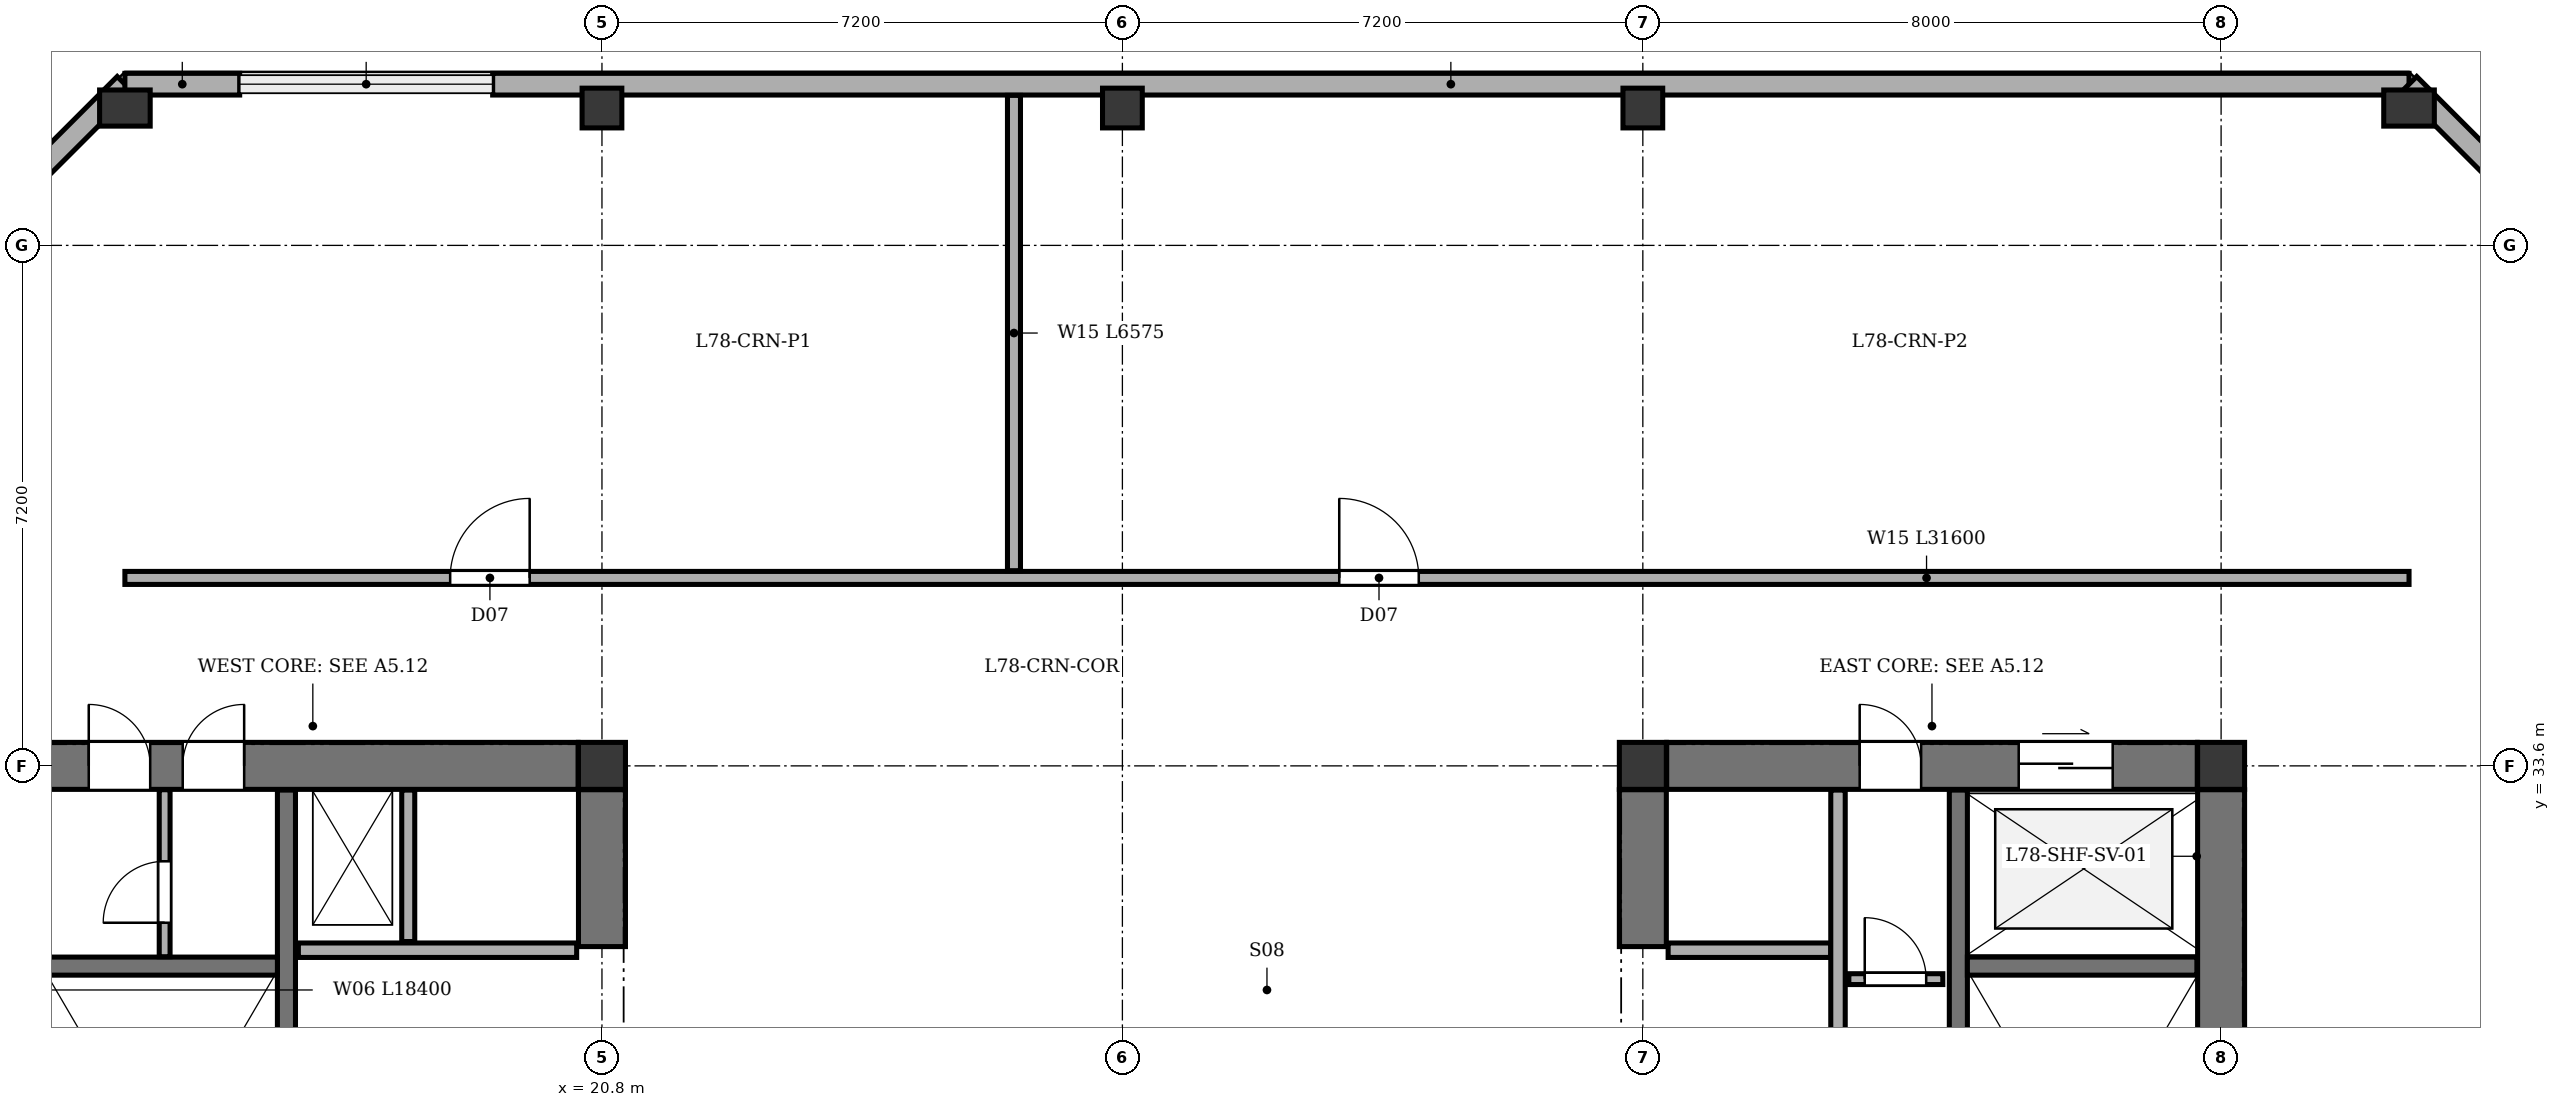
"""IFC4 building model, lengths in metres.
Left out: names, types, materials, properties, quantities, classifications, styles, units other than length and angle.
Written with IfcOpenShell. Run it as: python <this file> out.ifc"""

import sys

from ifc_helpers import new_model, si_unit, direction, frame, frame_2d, origin, origin_2d, place, context, subcontext, project, spatial, rectangle, extrude, element, fill, save


model = new_model("IFC4")
c1 = context("Model", 3, precision=1e-05, world=origin(), true_north=direction((0.0, 1.0)))
c2 = subcontext(c1, "Body", "Model", "MODEL_VIEW")
j1 = project(units=[si_unit("LENGTHUNIT", "METRE"), si_unit("PLANEANGLEUNIT", "RADIAN")], contexts=[c1])
p1 = place(None, origin())
s1 = spatial("IfcSite", under=j1, at=p1, CompositionType="ELEMENT")
p2 = place(p1, origin())
s2 = spatial("IfcBuilding", under=s1, at=p2, CompositionType="ELEMENT")
p3 = place(p2, frame((0.0, 0.0, 296.4)))
s3 = spatial("IfcBuildingStorey", under=s2, at=p3, CompositionType="ELEMENT", Elevation=296.4)
for number, where, z_axis, x_axis in (
    (1, (20.8, 33.6, 0.0), (0.0, 0.0, 1.0), (1.0, 0.0, 0.0)),
    (2, (35.2, 33.6, 0.0), (0.0, 0.0, 1.0), (1.0, 0.0, 0.0)),
    (3, (43.2, 33.6, 0.0), (0.0, 0.0, 1.0), (1.0, 0.0, 0.0)),
):
    element("IfcColumn", number, at=place(p3, frame(where, z_axis=z_axis, x_axis=x_axis)), inside=s3, PredefinedType="COLUMN", context=c2, shape_type="SweptSolid", body=[
        extrude(rectangle(XDim=0.65, YDim=0.65, at=origin_2d()), origin(), (0.0, 0.0, 1.0), 4.2),
    ])
p4 = place(p3, frame((14.2, 42.7, 0.0), z_axis=(0.0, 0.0, 1.0), x_axis=(1.0, 0.0, 0.0)))
e4 = element("IfcColumn", 4, at=p4, inside=s3, PredefinedType="COLUMN", context=c2, shape_type="SweptSolid", body=[
    extrude(rectangle(XDim=0.5, YDim=0.7, at=origin_2d()), origin(), (0.0, 0.0, 1.0), 4.2),
])
for number, where, z_axis, x_axis in (
    (5, (20.8, 42.7, 0.0), (0.0, 0.0, 1.0), (1.0, 0.0, 0.0)),
    (6, (28.0, 42.7, 0.0), (0.0, 0.0, 1.0), (1.0, 0.0, 0.0)),
    (7, (35.2, 42.7, 0.0), (0.0, 0.0, 1.0), (1.0, 0.0, 0.0)),
):
    element("IfcColumn", number, at=place(p3, frame(where, z_axis=z_axis, x_axis=x_axis)), inside=s3, PredefinedType="COLUMN", context=c2, shape_type="SweptSolid", body=[
        extrude(rectangle(XDim=0.55, YDim=0.55, at=origin_2d()), origin(), (0.0, 0.0, 1.0), 4.2),
    ])
p5 = place(p3, frame((45.8, 42.7, 0.0), z_axis=(0.0, 0.0, 1.0), x_axis=(1.0, 0.0, 0.0)))
e8 = element("IfcColumn", 8, at=p5, inside=s3, PredefinedType="COLUMN", context=c2, shape_type="SweptSolid", body=[
    extrude(rectangle(XDim=0.5, YDim=0.7, at=origin_2d()), origin(), (0.0, 0.0, 1.0), 4.2),
])
p6 = place(p3, frame((10.87, 39.7, 0.0), z_axis=(0.0, 0.0, 1.0), x_axis=(0.707080859425, 0.707132701998, 0.0)))
e9 = element("IfcWall", 9, at=p6, inside=s3, PredefinedType="STANDARD", context=c2, shape_type="SweptSolid", body=[
    extrude(rectangle(XDim=4.709, YDim=0.3, at=frame_2d((2.354, 0.0))), origin(), (0.0, 0.0, 1.0), 3.545),
])
p7 = place(p3, frame((14.2, 43.03, 0.0), z_axis=(0.0, 0.0, 1.0), x_axis=(1.0, 0.0, 0.0)))
e10 = element("IfcWall", 10, at=p7, inside=s3, PredefinedType="STANDARD", context=c2, shape_type="SweptSolid", body=[
    extrude(rectangle(XDim=1.588, YDim=0.3, at=frame_2d((0.794, 0.0))), origin(), (0.0, 0.0, 1.0), 3.545),
])
p8 = place(p3, frame((19.288, 43.03, 0.0), z_axis=(0.0, 0.0, 1.0), x_axis=(1.0, 0.0, 0.0)))
e11 = element("IfcWall", 11, at=p8, inside=s3, PredefinedType="STANDARD", context=c2, shape_type="SweptSolid", body=[
    extrude(rectangle(XDim=26.512, YDim=0.3, at=frame_2d((13.256, 0.0))), origin(), (0.0, 0.0, 1.0), 3.545),
])
p9 = place(p3, frame((45.8, 43.03, 0.0), z_axis=(0.0, 0.0, 1.0), x_axis=(0.707080859425, -0.707132701998, 0.0)))
e12 = element("IfcWall", 12, at=p9, inside=s3, PredefinedType="STANDARD", context=c2, shape_type="SweptSolid", body=[
    extrude(rectangle(XDim=4.709, YDim=0.3, at=frame_2d((2.354, 0.0))), origin(), (0.0, 0.0, 1.0), 3.545),
])
p10 = place(p3, frame((13.13, 33.6, 0.0), z_axis=(0.0, 0.0, 1.0), x_axis=(1.0, 0.0, 0.0)))
e13 = element("IfcWall", 13, at=p10, inside=s3, PredefinedType="SHEAR", context=c2, shape_type="SweptSolid", body=[
    extrude(rectangle(XDim=7.34, YDim=0.65, at=frame_2d((3.67, 0.0))), origin(), (0.0, 0.0, 1.0), 3.92),
])
p11 = place(p10, frame((0.57, 0.0, 0.0)))
e14 = element("IfcOpeningElement", 14, at=p11, cuts=e13, PredefinedType="OPENING", context=c2, shape_type="SweptSolid", body=[
    extrude(rectangle(XDim=0.85, YDim=2.02, at=frame_2d((0.425, 1.01))), frame((0.0, 0.335, 0.0), z_axis=(0.0, -1.0, 0.0), x_axis=(1.0, 0.0, 0.0)), (0.0, 0.0, 1.0), 0.67),
])
p12 = place(p10, frame((1.87, 0.0, 0.0)))
e15 = element("IfcOpeningElement", 15, at=p12, cuts=e13, PredefinedType="OPENING", context=c2, shape_type="SweptSolid", body=[
    extrude(rectangle(XDim=0.85, YDim=2.02, at=frame_2d((0.425, 1.01))), frame((0.0, 0.335, 0.0), z_axis=(0.0, -1.0, 0.0), x_axis=(1.0, 0.0, 0.0)), (0.0, 0.0, 1.0), 0.67),
])
p13 = place(p3, frame((20.8, 31.1, 0.0), z_axis=(0.0, 0.0, 1.0), x_axis=(0.0, 1.0, 0.0)))
e16 = element("IfcWall", 16, at=p13, inside=s3, PredefinedType="SHEAR", context=c2, shape_type="SweptSolid", body=[
    extrude(rectangle(XDim=2.17, YDim=0.65, at=frame_2d((1.085, 0.0))), origin(), (0.0, 0.0, 1.0), 3.92),
])
p14 = place(p3, frame((16.435, 21.135, 0.0), z_axis=(0.0, 0.0, 1.0), x_axis=(0.0, 1.0, 0.0)))
e17 = element("IfcWall", 17, at=p14, inside=s3, PredefinedType="SHEAR", context=c2, shape_type="SweptSolid", body=[
    extrude(rectangle(XDim=12.13, YDim=0.25, at=frame_2d((6.065, 0.0))), origin(), (0.0, 0.0, 1.0), 3.92),
])
p15 = place(p14, frame((0.515, 0.0, 0.0)))
e18 = element("IfcOpeningElement", 18, at=p15, cuts=e17, PredefinedType="OPENING", context=c2, shape_type="SweptSolid", body=[
    extrude(rectangle(XDim=1.2, YDim=2.15, at=frame_2d((0.6, 1.075))), frame((0.0, 0.135, 0.0), z_axis=(0.0, -1.0, 0.0), x_axis=(1.0, 0.0, 0.0)), (0.0, 0.0, 1.0), 0.27),
])
p16 = place(p14, frame((2.665, 0.0, 0.0)))
e19 = element("IfcOpeningElement", 19, at=p16, cuts=e17, PredefinedType="OPENING", context=c2, shape_type="SweptSolid", body=[
    extrude(rectangle(XDim=1.15, YDim=2.15, at=frame_2d((0.575, 1.075))), frame((0.0, 0.135, 0.0), z_axis=(0.0, -1.0, 0.0), x_axis=(1.0, 0.0, 0.0)), (0.0, 0.0, 1.0), 0.27),
])
p17 = place(p3, frame((13.135, 30.83, 0.0), z_axis=(0.0, 0.0, 1.0), x_axis=(1.0, 0.0, 0.0)))
e20 = element("IfcWall", 20, at=p17, inside=s3, PredefinedType="SHEAR", context=c2, shape_type="SweptSolid", body=[
    extrude(rectangle(XDim=3.175, YDim=0.25, at=frame_2d((1.587, 0.0))), origin(), (0.0, 0.0, 1.0), 3.92),
])
p18 = place(p3, frame((16.6, 31.05, 0.0), z_axis=(0.0, 0.0, 1.0), x_axis=(1.0, 0.0, 0.0)))
e21 = element("IfcWall", 21, at=p18, inside=s3, PredefinedType="SOLIDWALL", context=c2, shape_type="SweptSolid", body=[
    extrude(rectangle(XDim=3.85, YDim=0.2, at=frame_2d((1.925, 0.0))), origin(), (0.0, 0.0, 1.0), 3.92),
])
p19 = place(p3, frame((18.12, 31.17, 0.0), z_axis=(0.0, 0.0, 1.0), x_axis=(0.0, 1.0, 0.0)))
e22 = element("IfcWall", 22, at=p19, inside=s3, PredefinedType="PARTITIONING", context=c2, shape_type="SweptSolid", body=[
    extrude(rectangle(XDim=2.095, YDim=0.18, at=frame_2d((1.047, 0.0))), origin(), (0.0, 0.0, 1.0), 3.92),
])
p20 = place(p3, frame((43.2, 21.13, 0.0), z_axis=(0.0, 0.0, 1.0), x_axis=(0.0, 1.0, 0.0)))
e23 = element("IfcWall", 23, at=p20, inside=s3, PredefinedType="SHEAR", context=c2, shape_type="SweptSolid", body=[
    extrude(rectangle(XDim=12.14, YDim=0.65, at=frame_2d((6.07, 0.0))), origin(), (0.0, 0.0, 1.0), 3.92),
])
p21 = place(p3, frame((35.53, 33.6, 0.0), z_axis=(0.0, 0.0, 1.0), x_axis=(1.0, 0.0, 0.0)))
e24 = element("IfcWall", 24, at=p21, inside=s3, PredefinedType="SHEAR", context=c2, shape_type="SweptSolid", body=[
    extrude(rectangle(XDim=7.34, YDim=0.65, at=frame_2d((3.67, 0.0))), origin(), (0.0, 0.0, 1.0), 3.92),
])
p22 = place(p21, frame((4.87, 0.0, 0.0)))
e25 = element("IfcOpeningElement", 25, at=p22, cuts=e24, PredefinedType="OPENING", context=c2, shape_type="SweptSolid", body=[
    extrude(rectangle(XDim=1.3, YDim=2.15, at=frame_2d((0.65, 1.075))), frame((0.0, 0.335, 0.0), z_axis=(0.0, -1.0, 0.0), x_axis=(1.0, 0.0, 0.0)), (0.0, 0.0, 1.0), 0.67),
])
p23 = place(p21, frame((2.67, 0.0, 0.0)))
e26 = element("IfcOpeningElement", 26, at=p23, cuts=e24, PredefinedType="OPENING", context=c2, shape_type="SweptSolid", body=[
    extrude(rectangle(XDim=0.85, YDim=2.02, at=frame_2d((0.425, 1.01))), frame((0.0, 0.335, 0.0), z_axis=(0.0, -1.0, 0.0), x_axis=(1.0, 0.0, 0.0)), (0.0, 0.0, 1.0), 0.67),
])
p24 = place(p3, frame((35.2, 31.1, 0.0), z_axis=(0.0, 0.0, 1.0), x_axis=(0.0, 1.0, 0.0)))
e27 = element("IfcWall", 27, at=p24, inside=s3, PredefinedType="SHEAR", context=c2, shape_type="SweptSolid", body=[
    extrude(rectangle(XDim=2.17, YDim=0.65, at=frame_2d((1.085, 0.0))), origin(), (0.0, 0.0, 1.0), 3.92),
])
p25 = place(p3, frame((39.565, 21.135, 0.0), z_axis=(0.0, 0.0, 1.0), x_axis=(0.0, 1.0, 0.0)))
e28 = element("IfcWall", 28, at=p25, inside=s3, PredefinedType="SHEAR", context=c2, shape_type="SweptSolid", body=[
    extrude(rectangle(XDim=12.13, YDim=0.25, at=frame_2d((6.065, 0.0))), origin(), (0.0, 0.0, 1.0), 3.92),
])
p26 = place(p25, frame((0.515, 0.0, 0.0)))
e29 = element("IfcOpeningElement", 29, at=p26, cuts=e28, PredefinedType="OPENING", context=c2, shape_type="SweptSolid", body=[
    extrude(rectangle(XDim=1.2, YDim=2.15, at=frame_2d((0.6, 1.075))), frame((0.0, 0.135, 0.0), z_axis=(0.0, -1.0, 0.0), x_axis=(1.0, 0.0, 0.0)), (0.0, 0.0, 1.0), 0.27),
])
p27 = place(p25, frame((2.665, 0.0, 0.0)))
e30 = element("IfcOpeningElement", 30, at=p27, cuts=e28, PredefinedType="OPENING", context=c2, shape_type="SweptSolid", body=[
    extrude(rectangle(XDim=1.15, YDim=2.15, at=frame_2d((0.575, 1.075))), frame((0.0, 0.135, 0.0), z_axis=(0.0, -1.0, 0.0), x_axis=(1.0, 0.0, 0.0)), (0.0, 0.0, 1.0), 0.27),
])
p28 = place(p3, frame((39.69, 30.83, 0.0), z_axis=(0.0, 0.0, 1.0), x_axis=(1.0, 0.0, 0.0)))
e31 = element("IfcWall", 31, at=p28, inside=s3, PredefinedType="SHEAR", context=c2, shape_type="SweptSolid", body=[
    extrude(rectangle(XDim=3.175, YDim=0.25, at=frame_2d((1.587, 0.0))), origin(), (0.0, 0.0, 1.0), 3.92),
])
p29 = place(p3, frame((35.55, 31.05, 0.0), z_axis=(0.0, 0.0, 1.0), x_axis=(1.0, 0.0, 0.0)))
e32 = element("IfcWall", 32, at=p29, inside=s3, PredefinedType="SOLIDWALL", context=c2, shape_type="SweptSolid", body=[
    extrude(rectangle(XDim=2.25, YDim=0.2, at=frame_2d((1.125, 0.0))), origin(), (0.0, 0.0, 1.0), 3.92),
])
p30 = place(p3, frame((37.9, 25.27, 0.0), z_axis=(0.0, 0.0, 1.0), x_axis=(0.0, 1.0, 0.0)))
e33 = element("IfcWall", 33, at=p30, inside=s3, PredefinedType="SOLIDWALL", context=c2, shape_type="SweptSolid", body=[
    extrude(rectangle(XDim=7.995, YDim=0.2, at=frame_2d((3.998, 0.0))), origin(), (0.0, 0.0, 1.0), 3.92),
])
p31 = place(p3, frame((14.75, 30.96, 0.0), z_axis=(0.0, 0.0, 1.0), x_axis=(0.0, 1.0, 0.0)))
e34 = element("IfcWall", 34, at=p31, inside=s3, PredefinedType="PARTITIONING", context=c2, shape_type="SweptSolid", body=[
    extrude(rectangle(XDim=2.31, YDim=0.15, at=frame_2d((1.155, 0.0))), origin(), (0.0, 0.0, 1.0), 3.92),
])
p32 = place(p31, frame((0.47, 0.0, 0.0)))
e35 = element("IfcOpeningElement", 35, at=p32, cuts=e34, PredefinedType="OPENING", context=c2, shape_type="SweptSolid", body=[
    extrude(rectangle(XDim=0.85, YDim=2.02, at=frame_2d((0.425, 1.01))), frame((0.0, 0.085, 0.0), z_axis=(0.0, -1.0, 0.0), x_axis=(1.0, 0.0, 0.0)), (0.0, 0.0, 1.0), 0.17),
])
p33 = place(p3, frame((38.05, 30.65, 0.0), z_axis=(0.0, 0.0, 1.0), x_axis=(1.0, 0.0, 0.0)))
e36 = element("IfcWall", 36, at=p33, inside=s3, PredefinedType="PARTITIONING", context=c2, shape_type="SweptSolid", body=[
    extrude(rectangle(XDim=1.3, YDim=0.15, at=frame_2d((0.65, 0.0))), origin(), (0.0, 0.0, 1.0), 3.92),
])
p34 = place(p33, frame((0.22, 0.0, 0.0)))
e37 = element("IfcOpeningElement", 37, at=p34, cuts=e36, PredefinedType="OPENING", context=c2, shape_type="SweptSolid", body=[
    extrude(rectangle(XDim=0.85, YDim=2.02, at=frame_2d((0.425, 1.01))), frame((0.0, 0.085, 0.0), z_axis=(0.0, -1.0, 0.0), x_axis=(1.0, 0.0, 0.0)), (0.0, 0.0, 1.0), 0.17),
])
p35 = place(p3, frame((14.2, 36.2, 0.0), z_axis=(0.0, 0.0, 1.0), x_axis=(1.0, 0.0, 0.0)))
e38 = element("IfcWall", 38, at=p35, inside=s3, PredefinedType="PARTITIONING", context=c2, shape_type="SweptSolid", body=[
    extrude(rectangle(XDim=31.6, YDim=0.18, at=frame_2d((15.8, 0.0))), origin(), (0.0, 0.0, 1.0), 3.92),
])
p36 = place(p35, frame((4.5, 0.0, 0.0)))
e39 = element("IfcOpeningElement", 39, at=p36, cuts=e38, PredefinedType="OPENING", context=c2, shape_type="SweptSolid", body=[
    extrude(rectangle(XDim=1.1, YDim=2.15, at=frame_2d((0.55, 1.075))), frame((0.0, 0.1, 0.0), z_axis=(0.0, -1.0, 0.0), x_axis=(1.0, 0.0, 0.0)), (0.0, 0.0, 1.0), 0.2),
])
p37 = place(p35, frame((16.8, 0.0, 0.0)))
e40 = element("IfcOpeningElement", 40, at=p37, cuts=e38, PredefinedType="OPENING", context=c2, shape_type="SweptSolid", body=[
    extrude(rectangle(XDim=1.1, YDim=2.15, at=frame_2d((0.55, 1.075))), frame((0.0, 0.1, 0.0), z_axis=(0.0, -1.0, 0.0), x_axis=(1.0, 0.0, 0.0)), (0.0, 0.0, 1.0), 0.2),
])
p38 = place(p3, frame((26.5, 36.3, 0.0), z_axis=(0.0, 0.0, 1.0), x_axis=(0.0, 1.0, 0.0)))
e41 = element("IfcWall", 41, at=p38, inside=s3, PredefinedType="PARTITIONING", context=c2, shape_type="SweptSolid", body=[
    extrude(rectangle(XDim=6.575, YDim=0.18, at=frame_2d((3.288, 0.0))), origin(), (0.0, 0.0, 1.0), 3.92),
])
p39 = place(p11, origin())
e42 = element("IfcDoor", 42, at=p39, inside=s3, OperationType="SINGLE_SWING_LEFT", PredefinedType="DOOR", context=c2, shape_type="SweptSolid", body=[
    extrude(rectangle(XDim=0.85, YDim=2.02, at=frame_2d((0.425, 1.01))), frame((0.0, 0.025, 0.0), z_axis=(0.0, -1.0, 0.0), x_axis=(1.0, 0.0, 0.0)), (0.0, 0.0, 1.0), 0.05),
])
fill(e14, e42)
p40 = place(p12, origin())
e43 = element("IfcDoor", 43, at=p40, inside=s3, OperationType="SINGLE_SWING_RIGHT", PredefinedType="DOOR", context=c2, shape_type="SweptSolid", body=[
    extrude(rectangle(XDim=0.85, YDim=2.02, at=frame_2d((0.425, 1.01))), frame((0.0, 0.025, 0.0), z_axis=(0.0, -1.0, 0.0), x_axis=(1.0, 0.0, 0.0)), (0.0, 0.0, 1.0), 0.05),
])
fill(e15, e43)
p41 = place(p22, origin())
e44 = element("IfcDoor", 44, at=p41, inside=s3, OperationType="DOUBLE_DOOR_SLIDING", PredefinedType="DOOR", context=c2, shape_type="SweptSolid", body=[
    extrude(rectangle(XDim=1.3, YDim=2.15, at=frame_2d((0.65, 1.075))), frame((0.0, 0.025, 0.0), z_axis=(0.0, -1.0, 0.0), x_axis=(1.0, 0.0, 0.0)), (0.0, 0.0, 1.0), 0.05),
])
fill(e25, e44)
p42 = place(p23, origin())
e45 = element("IfcDoor", 45, at=p42, inside=s3, OperationType="SINGLE_SWING_LEFT", PredefinedType="DOOR", context=c2, shape_type="SweptSolid", body=[
    extrude(rectangle(XDim=0.85, YDim=2.02, at=frame_2d((0.425, 1.01))), frame((0.0, 0.025, 0.0), z_axis=(0.0, -1.0, 0.0), x_axis=(1.0, 0.0, 0.0)), (0.0, 0.0, 1.0), 0.05),
])
fill(e26, e45)
p43 = place(p32, origin())
e46 = element("IfcDoor", 46, at=p43, inside=s3, OperationType="SINGLE_SWING_LEFT", PredefinedType="DOOR", context=c2, shape_type="SweptSolid", body=[
    extrude(rectangle(XDim=0.85, YDim=2.02, at=frame_2d((0.425, 1.01))), frame((0.0, 0.025, 0.0), z_axis=(0.0, -1.0, 0.0), x_axis=(1.0, 0.0, 0.0)), (0.0, 0.0, 1.0), 0.05),
])
fill(e35, e46)
p44 = place(p34, origin())
e47 = element("IfcDoor", 47, at=p44, inside=s3, OperationType="SINGLE_SWING_LEFT", PredefinedType="DOOR", context=c2, shape_type="SweptSolid", body=[
    extrude(rectangle(XDim=0.85, YDim=2.02, at=frame_2d((0.425, 1.01))), frame((0.0, 0.025, 0.0), z_axis=(0.0, -1.0, 0.0), x_axis=(1.0, 0.0, 0.0)), (0.0, 0.0, 1.0), 0.05),
])
fill(e37, e47)
p45 = place(p36, origin())
e48 = element("IfcDoor", 48, at=p45, inside=s3, OperationType="SINGLE_SWING_RIGHT", PredefinedType="DOOR", context=c2, shape_type="SweptSolid", body=[
    extrude(rectangle(XDim=1.1, YDim=2.15, at=frame_2d((0.55, 1.075))), frame((0.0, 0.025, 0.0), z_axis=(0.0, -1.0, 0.0), x_axis=(1.0, 0.0, 0.0)), (0.0, 0.0, 1.0), 0.05),
])
fill(e39, e48)
p46 = place(p37, origin())
e49 = element("IfcDoor", 49, at=p46, inside=s3, OperationType="SINGLE_SWING_LEFT", PredefinedType="DOOR", context=c2, shape_type="SweptSolid", body=[
    extrude(rectangle(XDim=1.1, YDim=2.15, at=frame_2d((0.55, 1.075))), frame((0.0, 0.025, 0.0), z_axis=(0.0, -1.0, 0.0), x_axis=(1.0, 0.0, 0.0)), (0.0, 0.0, 1.0), 0.05),
])
fill(e40, e49)
save(model, sys.argv[1])
